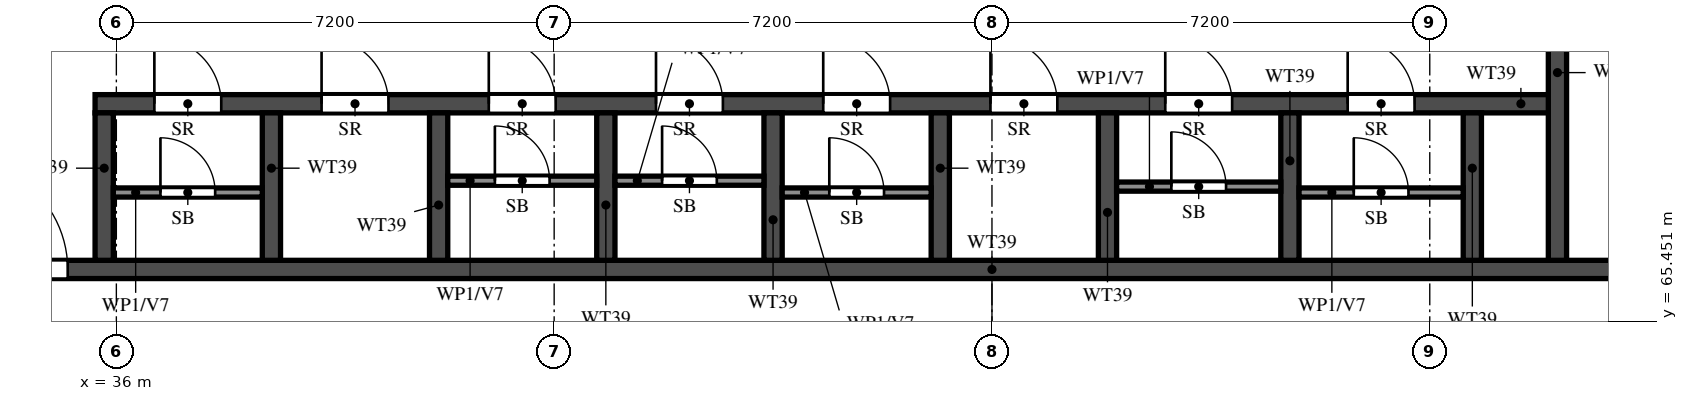
"""IFC4 building model, lengths in metres.
Left out: names, types, materials, properties, quantities, classifications, styles, units other than length and angle.
Written with IfcOpenShell. Run it as: python <this file> out.ifc"""

import sys

from ifc_helpers import new_model, si_unit, direction, frame, frame_2d, origin, place, context, subcontext, project, spatial, rectangle, extrude, element, fill, save


model = new_model("IFC4")
c1 = context("Model", 3, precision=1e-05, world=origin(), true_north=direction((0.0, 1.0)))
c2 = subcontext(c1, "Body", "Model", "MODEL_VIEW")
j1 = project(units=[si_unit("LENGTHUNIT", "METRE"), si_unit("PLANEANGLEUNIT", "RADIAN")], contexts=[c1])
p1 = place(None, origin())
s1 = spatial("IfcSite", under=j1, at=p1, CompositionType="ELEMENT")
p2 = place(p1, origin())
s2 = spatial("IfcBuilding", under=s1, at=p2, CompositionType="ELEMENT")
p3 = place(p2, frame((0.0, 0.0, 267.5)))
s3 = spatial("IfcBuildingStorey", under=s2, at=p3, CompositionType="ELEMENT", Elevation=267.5)
p4 = place(p3, frame((29.2, 66.3, 0.0), z_axis=(0.0, 0.0, 1.0), x_axis=(1.0, 0.0, 0.0)))
e1 = element("IfcWall", 1, at=p4, inside=s3, PredefinedType="SHEAR", context=c2, shape_type="SweptSolid", body=[
    extrude(rectangle(XDim=42.4, YDim=0.3, at=frame_2d((21.2, 0.0))), origin(), (0.0, 0.0, 1.0), 3.099),
])
p5 = place(p4, frame((1.425, 0.0, 0.0)))
e2 = element("IfcOpeningElement", 2, at=p5, cuts=e1, PredefinedType="OPENING", context=c2, shape_type="SweptSolid", body=[
    extrude(rectangle(XDim=1.1, YDim=2.1, at=frame_2d((0.55, 1.05))), frame((0.0, 0.16, 0.0), z_axis=(0.0, -1.0, 0.0), x_axis=(1.0, 0.0, 0.0)), (0.0, 0.0, 1.0), 0.32),
])
p6 = place(p4, frame((4.2, 0.0, 0.0)))
e3 = element("IfcOpeningElement", 3, at=p6, cuts=e1, PredefinedType="OPENING", context=c2, shape_type="SweptSolid", body=[
    extrude(rectangle(XDim=1.8, YDim=2.1, at=frame_2d((0.9, 1.05))), frame((0.0, 0.16, 0.0), z_axis=(0.0, -1.0, 0.0), x_axis=(1.0, 0.0, 0.0)), (0.0, 0.0, 1.0), 0.32),
])
p7 = place(p3, frame((35.65, 69.025, 0.0), z_axis=(0.0, 0.0, 1.0), x_axis=(1.0, 0.0, 0.0)))
e4 = element("IfcWall", 4, at=p7, inside=s3, PredefinedType="SHEAR", context=c2, shape_type="SweptSolid", body=[
    extrude(rectangle(XDim=24.05, YDim=0.3, at=frame_2d((12.025, 0.0))), origin(), (0.0, 0.0, 1.0), 3.099),
])
p8 = place(p7, frame((0.975, 0.0, 0.0)))
e5 = element("IfcOpeningElement", 5, at=p8, cuts=e4, PredefinedType="OPENING", context=c2, shape_type="SweptSolid", body=[
    extrude(rectangle(XDim=1.1, YDim=2.1, at=frame_2d((0.55, 1.05))), frame((0.0, 0.16, 0.0), z_axis=(0.0, -1.0, 0.0), x_axis=(1.0, 0.0, 0.0)), (0.0, 0.0, 1.0), 0.32),
])
p9 = place(p7, frame((3.725, 0.0, 0.0)))
e6 = element("IfcOpeningElement", 6, at=p9, cuts=e4, PredefinedType="OPENING", context=c2, shape_type="SweptSolid", body=[
    extrude(rectangle(XDim=1.1, YDim=2.1, at=frame_2d((0.55, 1.05))), frame((0.0, 0.16, 0.0), z_axis=(0.0, -1.0, 0.0), x_axis=(1.0, 0.0, 0.0)), (0.0, 0.0, 1.0), 0.32),
])
p10 = place(p7, frame((6.475, 0.0, 0.0)))
e7 = element("IfcOpeningElement", 7, at=p10, cuts=e4, PredefinedType="OPENING", context=c2, shape_type="SweptSolid", body=[
    extrude(rectangle(XDim=1.1, YDim=2.1, at=frame_2d((0.55, 1.05))), frame((0.0, 0.16, 0.0), z_axis=(0.0, -1.0, 0.0), x_axis=(1.0, 0.0, 0.0)), (0.0, 0.0, 1.0), 0.32),
])
p11 = place(p7, frame((9.225, 0.0, 0.0)))
e8 = element("IfcOpeningElement", 8, at=p11, cuts=e4, PredefinedType="OPENING", context=c2, shape_type="SweptSolid", body=[
    extrude(rectangle(XDim=1.1, YDim=2.1, at=frame_2d((0.55, 1.05))), frame((0.0, 0.16, 0.0), z_axis=(0.0, -1.0, 0.0), x_axis=(1.0, 0.0, 0.0)), (0.0, 0.0, 1.0), 0.32),
])
p12 = place(p7, frame((11.975, 0.0, 0.0)))
e9 = element("IfcOpeningElement", 9, at=p12, cuts=e4, PredefinedType="OPENING", context=c2, shape_type="SweptSolid", body=[
    extrude(rectangle(XDim=1.1, YDim=2.1, at=frame_2d((0.55, 1.05))), frame((0.0, 0.16, 0.0), z_axis=(0.0, -1.0, 0.0), x_axis=(1.0, 0.0, 0.0)), (0.0, 0.0, 1.0), 0.32),
])
p13 = place(p7, frame((14.725, 0.0, 0.0)))
e10 = element("IfcOpeningElement", 10, at=p13, cuts=e4, PredefinedType="OPENING", context=c2, shape_type="SweptSolid", body=[
    extrude(rectangle(XDim=1.1, YDim=2.1, at=frame_2d((0.55, 1.05))), frame((0.0, 0.16, 0.0), z_axis=(0.0, -1.0, 0.0), x_axis=(1.0, 0.0, 0.0)), (0.0, 0.0, 1.0), 0.32),
])
p14 = place(p7, frame((17.6, 0.0, 0.0)))
e11 = element("IfcOpeningElement", 11, at=p14, cuts=e4, PredefinedType="OPENING", context=c2, shape_type="SweptSolid", body=[
    extrude(rectangle(XDim=1.1, YDim=2.1, at=frame_2d((0.55, 1.05))), frame((0.0, 0.16, 0.0), z_axis=(0.0, -1.0, 0.0), x_axis=(1.0, 0.0, 0.0)), (0.0, 0.0, 1.0), 0.32),
])
p15 = place(p7, frame((20.6, 0.0, 0.0)))
e12 = element("IfcOpeningElement", 12, at=p15, cuts=e4, PredefinedType="OPENING", context=c2, shape_type="SweptSolid", body=[
    extrude(rectangle(XDim=1.1, YDim=2.1, at=frame_2d((0.55, 1.05))), frame((0.0, 0.16, 0.0), z_axis=(0.0, -1.0, 0.0), x_axis=(1.0, 0.0, 0.0)), (0.0, 0.0, 1.0), 0.32),
])
p16 = place(p3, frame((59.7, 66.45, 0.0), z_axis=(0.0, 0.0, 1.0), x_axis=(0.0, 1.0, 0.0)))
e13 = element("IfcWall", 13, at=p16, inside=s3, PredefinedType="SHEAR", context=c2, shape_type="SweptSolid", body=[
    extrude(rectangle(XDim=6.175, YDim=0.3, at=frame_2d((3.087, 0.0))), origin(), (0.0, 0.0, 1.0), 3.099),
])
p17 = place(p16, frame((3.85, 0.0, 0.0)))
e14 = element("IfcOpeningElement", 14, at=p17, cuts=e13, PredefinedType="OPENING", context=c2, shape_type="SweptSolid", body=[
    extrude(rectangle(XDim=1.2, YDim=2.1, at=frame_2d((0.6, 1.05))), frame((0.0, 0.16, 0.0), z_axis=(0.0, -1.0, 0.0), x_axis=(1.0, 0.0, 0.0)), (0.0, 0.0, 1.0), 0.32),
])
for number, where, z_axis, x_axis in (
    (15, (35.8, 66.45, 0.0), (0.0, 0.0, 1.0), (0.0, 1.0, 0.0)),
    (16, (38.55, 66.45, 0.0), (0.0, 0.0, 1.0), (0.0, 1.0, 0.0)),
    (17, (41.3, 66.45, 0.0), (0.0, 0.0, 1.0), (0.0, 1.0, 0.0)),
    (18, (44.05, 66.45, 0.0), (0.0, 0.0, 1.0), (0.0, 1.0, 0.0)),
    (19, (46.8, 66.45, 0.0), (0.0, 0.0, 1.0), (0.0, 1.0, 0.0)),
    (20, (49.55, 66.45, 0.0), (0.0, 0.0, 1.0), (0.0, 1.0, 0.0)),
    (21, (52.3, 66.45, 0.0), (0.0, 0.0, 1.0), (0.0, 1.0, 0.0)),
    (22, (55.3, 66.45, 0.0), (0.0, 0.0, 1.0), (0.0, 1.0, 0.0)),
    (23, (58.3, 66.45, 0.0), (0.0, 0.0, 1.0), (0.0, 1.0, 0.0)),
):
    element("IfcWall", number, at=place(p3, frame(where, z_axis=z_axis, x_axis=x_axis)), inside=s3, PredefinedType="SHEAR", context=c2, shape_type="SweptSolid", body=[
        extrude(rectangle(XDim=2.425, YDim=0.3, at=frame_2d((1.212, 0.0))), origin(), (0.0, 0.0, 1.0), 3.099),
    ])
p18 = place(p3, frame((35.95, 67.565, 0.0), z_axis=(0.0, 0.0, 1.0), x_axis=(1.0, 0.0, 0.0)))
e24 = element("IfcWall", 24, at=p18, inside=s3, PredefinedType="PARTITIONING", context=c2, shape_type="SweptSolid", body=[
    extrude(rectangle(XDim=2.45, YDim=0.15, at=frame_2d((1.225, 0.0))), origin(), (0.0, 0.0, 1.0), 3.099),
])
p19 = place(p18, frame((0.775, 0.0, 0.0)))
e25 = element("IfcOpeningElement", 25, at=p19, cuts=e24, PredefinedType="OPENING", context=c2, shape_type="SweptSolid", body=[
    extrude(rectangle(XDim=0.9, YDim=2.1, at=frame_2d((0.45, 1.05))), frame((0.0, 0.085, 0.0), z_axis=(0.0, -1.0, 0.0), x_axis=(1.0, 0.0, 0.0)), (0.0, 0.0, 1.0), 0.17),
])
p20 = place(p3, frame((41.45, 67.76, 0.0), z_axis=(0.0, 0.0, 1.0), x_axis=(1.0, 0.0, 0.0)))
e26 = element("IfcWall", 26, at=p20, inside=s3, PredefinedType="PARTITIONING", context=c2, shape_type="SweptSolid", body=[
    extrude(rectangle(XDim=2.45, YDim=0.15, at=frame_2d((1.225, 0.0))), origin(), (0.0, 0.0, 1.0), 3.099),
])
p21 = place(p20, frame((0.775, 0.0, 0.0)))
e27 = element("IfcOpeningElement", 27, at=p21, cuts=e26, PredefinedType="OPENING", context=c2, shape_type="SweptSolid", body=[
    extrude(rectangle(XDim=0.9, YDim=2.1, at=frame_2d((0.45, 1.05))), frame((0.0, 0.085, 0.0), z_axis=(0.0, -1.0, 0.0), x_axis=(1.0, 0.0, 0.0)), (0.0, 0.0, 1.0), 0.17),
])
p22 = place(p3, frame((44.2, 67.76, 0.0), z_axis=(0.0, 0.0, 1.0), x_axis=(1.0, 0.0, 0.0)))
e28 = element("IfcWall", 28, at=p22, inside=s3, PredefinedType="PARTITIONING", context=c2, shape_type="SweptSolid", body=[
    extrude(rectangle(XDim=2.45, YDim=0.15, at=frame_2d((1.225, 0.0))), origin(), (0.0, 0.0, 1.0), 3.099),
])
p23 = place(p22, frame((0.775, 0.0, 0.0)))
e29 = element("IfcOpeningElement", 29, at=p23, cuts=e28, PredefinedType="OPENING", context=c2, shape_type="SweptSolid", body=[
    extrude(rectangle(XDim=0.9, YDim=2.1, at=frame_2d((0.45, 1.05))), frame((0.0, 0.085, 0.0), z_axis=(0.0, -1.0, 0.0), x_axis=(1.0, 0.0, 0.0)), (0.0, 0.0, 1.0), 0.17),
])
p24 = place(p3, frame((46.95, 67.565, 0.0), z_axis=(0.0, 0.0, 1.0), x_axis=(1.0, 0.0, 0.0)))
e30 = element("IfcWall", 30, at=p24, inside=s3, PredefinedType="PARTITIONING", context=c2, shape_type="SweptSolid", body=[
    extrude(rectangle(XDim=2.45, YDim=0.15, at=frame_2d((1.225, 0.0))), origin(), (0.0, 0.0, 1.0), 3.099),
])
p25 = place(p24, frame((0.775, 0.0, 0.0)))
e31 = element("IfcOpeningElement", 31, at=p25, cuts=e30, PredefinedType="OPENING", context=c2, shape_type="SweptSolid", body=[
    extrude(rectangle(XDim=0.9, YDim=2.1, at=frame_2d((0.45, 1.05))), frame((0.0, 0.085, 0.0), z_axis=(0.0, -1.0, 0.0), x_axis=(1.0, 0.0, 0.0)), (0.0, 0.0, 1.0), 0.17),
])
p26 = place(p3, frame((52.45, 67.663, 0.0), z_axis=(0.0, 0.0, 1.0), x_axis=(1.0, 0.0, 0.0)))
e32 = element("IfcWall", 32, at=p26, inside=s3, PredefinedType="PARTITIONING", context=c2, shape_type="SweptSolid", body=[
    extrude(rectangle(XDim=2.7, YDim=0.15, at=frame_2d((1.35, 0.0))), origin(), (0.0, 0.0, 1.0), 3.099),
])
p27 = place(p26, frame((0.9, 0.0, 0.0)))
e33 = element("IfcOpeningElement", 33, at=p27, cuts=e32, PredefinedType="OPENING", context=c2, shape_type="SweptSolid", body=[
    extrude(rectangle(XDim=0.9, YDim=2.1, at=frame_2d((0.45, 1.05))), frame((0.0, 0.085, 0.0), z_axis=(0.0, -1.0, 0.0), x_axis=(1.0, 0.0, 0.0)), (0.0, 0.0, 1.0), 0.17),
])
p28 = place(p3, frame((55.45, 67.565, 0.0), z_axis=(0.0, 0.0, 1.0), x_axis=(1.0, 0.0, 0.0)))
e34 = element("IfcWall", 34, at=p28, inside=s3, PredefinedType="PARTITIONING", context=c2, shape_type="SweptSolid", body=[
    extrude(rectangle(XDim=2.7, YDim=0.15, at=frame_2d((1.35, 0.0))), origin(), (0.0, 0.0, 1.0), 3.099),
])
p29 = place(p28, frame((0.9, 0.0, 0.0)))
e35 = element("IfcOpeningElement", 35, at=p29, cuts=e34, PredefinedType="OPENING", context=c2, shape_type="SweptSolid", body=[
    extrude(rectangle(XDim=0.9, YDim=2.1, at=frame_2d((0.45, 1.05))), frame((0.0, 0.085, 0.0), z_axis=(0.0, -1.0, 0.0), x_axis=(1.0, 0.0, 0.0)), (0.0, 0.0, 1.0), 0.17),
])
p30 = place(p6, origin())
e36 = element("IfcDoor", 36, at=p30, inside=s3, OperationType="DOUBLE_DOOR_SINGLE_SWING", PredefinedType="DOOR", context=c2, shape_type="SweptSolid", body=[
    extrude(rectangle(XDim=1.8, YDim=2.1, at=frame_2d((0.9, 1.05))), frame((0.0, 0.025, 0.0), z_axis=(0.0, -1.0, 0.0), x_axis=(1.0, 0.0, 0.0)), (0.0, 0.0, 1.0), 0.05),
])
fill(e3, e36)
p31 = place(p8, origin())
e37 = element("IfcDoor", 37, at=p31, inside=s3, OperationType="SINGLE_SWING_RIGHT", PredefinedType="DOOR", context=c2, shape_type="SweptSolid", body=[
    extrude(rectangle(XDim=1.1, YDim=2.1, at=frame_2d((0.55, 1.05))), frame((0.0, 0.025, 0.0), z_axis=(0.0, -1.0, 0.0), x_axis=(1.0, 0.0, 0.0)), (0.0, 0.0, 1.0), 0.05),
])
fill(e5, e37)
p32 = place(p19, origin())
e38 = element("IfcDoor", 38, at=p32, inside=s3, OperationType="SINGLE_SWING_RIGHT", PredefinedType="DOOR", context=c2, shape_type="SweptSolid", body=[
    extrude(rectangle(XDim=0.9, YDim=2.1, at=frame_2d((0.45, 1.05))), frame((0.0, 0.025, 0.0), z_axis=(0.0, -1.0, 0.0), x_axis=(1.0, 0.0, 0.0)), (0.0, 0.0, 1.0), 0.05),
])
fill(e25, e38)
p33 = place(p9, origin())
e39 = element("IfcDoor", 39, at=p33, inside=s3, OperationType="SINGLE_SWING_LEFT", PredefinedType="DOOR", context=c2, shape_type="SweptSolid", body=[
    extrude(rectangle(XDim=1.1, YDim=2.1, at=frame_2d((0.55, 1.05))), frame((0.0, 0.025, 0.0), z_axis=(0.0, -1.0, 0.0), x_axis=(1.0, 0.0, 0.0)), (0.0, 0.0, 1.0), 0.05),
])
fill(e6, e39)
p34 = place(p10, origin())
e40 = element("IfcDoor", 40, at=p34, inside=s3, OperationType="SINGLE_SWING_RIGHT", PredefinedType="DOOR", context=c2, shape_type="SweptSolid", body=[
    extrude(rectangle(XDim=1.1, YDim=2.1, at=frame_2d((0.55, 1.05))), frame((0.0, 0.025, 0.0), z_axis=(0.0, -1.0, 0.0), x_axis=(1.0, 0.0, 0.0)), (0.0, 0.0, 1.0), 0.05),
])
fill(e7, e40)
p35 = place(p21, origin())
e41 = element("IfcDoor", 41, at=p35, inside=s3, OperationType="SINGLE_SWING_LEFT", PredefinedType="DOOR", context=c2, shape_type="SweptSolid", body=[
    extrude(rectangle(XDim=0.9, YDim=2.1, at=frame_2d((0.45, 1.05))), frame((0.0, 0.025, 0.0), z_axis=(0.0, -1.0, 0.0), x_axis=(1.0, 0.0, 0.0)), (0.0, 0.0, 1.0), 0.05),
])
fill(e27, e41)
p36 = place(p11, origin())
e42 = element("IfcDoor", 42, at=p36, inside=s3, OperationType="SINGLE_SWING_LEFT", PredefinedType="DOOR", context=c2, shape_type="SweptSolid", body=[
    extrude(rectangle(XDim=1.1, YDim=2.1, at=frame_2d((0.55, 1.05))), frame((0.0, 0.025, 0.0), z_axis=(0.0, -1.0, 0.0), x_axis=(1.0, 0.0, 0.0)), (0.0, 0.0, 1.0), 0.05),
])
fill(e8, e42)
p37 = place(p23, origin())
e43 = element("IfcDoor", 43, at=p37, inside=s3, OperationType="SINGLE_SWING_RIGHT", PredefinedType="DOOR", context=c2, shape_type="SweptSolid", body=[
    extrude(rectangle(XDim=0.9, YDim=2.1, at=frame_2d((0.45, 1.05))), frame((0.0, 0.025, 0.0), z_axis=(0.0, -1.0, 0.0), x_axis=(1.0, 0.0, 0.0)), (0.0, 0.0, 1.0), 0.05),
])
fill(e29, e43)
p38 = place(p12, origin())
e44 = element("IfcDoor", 44, at=p38, inside=s3, OperationType="SINGLE_SWING_RIGHT", PredefinedType="DOOR", context=c2, shape_type="SweptSolid", body=[
    extrude(rectangle(XDim=1.1, YDim=2.1, at=frame_2d((0.55, 1.05))), frame((0.0, 0.025, 0.0), z_axis=(0.0, -1.0, 0.0), x_axis=(1.0, 0.0, 0.0)), (0.0, 0.0, 1.0), 0.05),
])
fill(e9, e44)
p39 = place(p25, origin())
e45 = element("IfcDoor", 45, at=p39, inside=s3, OperationType="SINGLE_SWING_RIGHT", PredefinedType="DOOR", context=c2, shape_type="SweptSolid", body=[
    extrude(rectangle(XDim=0.9, YDim=2.1, at=frame_2d((0.45, 1.05))), frame((0.0, 0.025, 0.0), z_axis=(0.0, -1.0, 0.0), x_axis=(1.0, 0.0, 0.0)), (0.0, 0.0, 1.0), 0.05),
])
fill(e31, e45)
p40 = place(p13, origin())
e46 = element("IfcDoor", 46, at=p40, inside=s3, OperationType="SINGLE_SWING_LEFT", PredefinedType="DOOR", context=c2, shape_type="SweptSolid", body=[
    extrude(rectangle(XDim=1.1, YDim=2.1, at=frame_2d((0.55, 1.05))), frame((0.0, 0.025, 0.0), z_axis=(0.0, -1.0, 0.0), x_axis=(1.0, 0.0, 0.0)), (0.0, 0.0, 1.0), 0.05),
])
fill(e10, e46)
p41 = place(p14, origin())
e47 = element("IfcDoor", 47, at=p41, inside=s3, OperationType="SINGLE_SWING_RIGHT", PredefinedType="DOOR", context=c2, shape_type="SweptSolid", body=[
    extrude(rectangle(XDim=1.1, YDim=2.1, at=frame_2d((0.55, 1.05))), frame((0.0, 0.025, 0.0), z_axis=(0.0, -1.0, 0.0), x_axis=(1.0, 0.0, 0.0)), (0.0, 0.0, 1.0), 0.05),
])
fill(e11, e47)
p42 = place(p27, origin())
e48 = element("IfcDoor", 48, at=p42, inside=s3, OperationType="SINGLE_SWING_LEFT", PredefinedType="DOOR", context=c2, shape_type="SweptSolid", body=[
    extrude(rectangle(XDim=0.9, YDim=2.1, at=frame_2d((0.45, 1.05))), frame((0.0, 0.025, 0.0), z_axis=(0.0, -1.0, 0.0), x_axis=(1.0, 0.0, 0.0)), (0.0, 0.0, 1.0), 0.05),
])
fill(e33, e48)
p43 = place(p15, origin())
e49 = element("IfcDoor", 49, at=p43, inside=s3, OperationType="SINGLE_SWING_RIGHT", PredefinedType="DOOR", context=c2, shape_type="SweptSolid", body=[
    extrude(rectangle(XDim=1.1, YDim=2.1, at=frame_2d((0.55, 1.05))), frame((0.0, 0.025, 0.0), z_axis=(0.0, -1.0, 0.0), x_axis=(1.0, 0.0, 0.0)), (0.0, 0.0, 1.0), 0.05),
])
fill(e12, e49)
p44 = place(p29, origin())
e50 = element("IfcDoor", 50, at=p44, inside=s3, OperationType="SINGLE_SWING_RIGHT", PredefinedType="DOOR", context=c2, shape_type="SweptSolid", body=[
    extrude(rectangle(XDim=0.9, YDim=2.1, at=frame_2d((0.45, 1.05))), frame((0.0, 0.025, 0.0), z_axis=(0.0, -1.0, 0.0), x_axis=(1.0, 0.0, 0.0)), (0.0, 0.0, 1.0), 0.05),
])
fill(e35, e50)
save(model, sys.argv[1])
